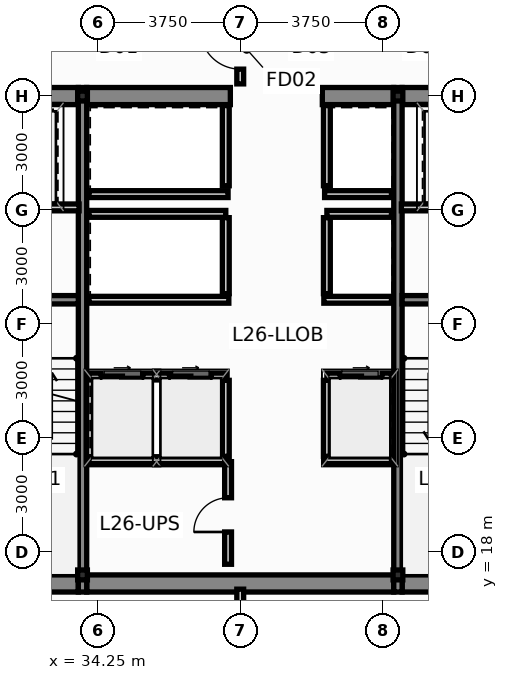
"""IFC4 building model, lengths in metres.
Left out: names, types, materials, properties, quantities, classifications, styles, units other than length and angle.
Written with IfcOpenShell. Run it as: python <this file> out.ifc"""

import sys

from ifc_helpers import new_model, si_unit, direction, frame, frame_2d, origin, origin_2d, place, context, subcontext, project, spatial, rectangle, i_section, extrude, source, transform, mapped, element, fill, save


model = new_model("IFC4")
c1 = context("Model", 3, precision=1e-05, world=origin(), true_north=direction((0.0, 1.0)))
c2 = subcontext(c1, "Body", "Model", "MODEL_VIEW")
j1 = project(units=[si_unit("LENGTHUNIT", "METRE"), si_unit("PLANEANGLEUNIT", "RADIAN")], contexts=[c1])
p1 = place(None, origin())
s1 = spatial("IfcSite", under=j1, at=p1, CompositionType="ELEMENT")
p2 = place(p1, origin())
s2 = spatial("IfcBuilding", under=s1, at=p2, CompositionType="ELEMENT")
p3 = place(p2, frame((0.0, 0.0, 101.75)))
s3 = spatial("IfcBuildingStorey", under=s2, at=p3, CompositionType="ELEMENT", Elevation=101.75)
m1 = source(origin(), c2, "Body", "SweptSolid", [
    extrude(i_section(OverallWidth=0.256, OverallDepth=0.26, WebThickness=0.01, FlangeThickness=0.017, at=origin_2d()), origin(), (0.0, 0.0, 1.0), 3.65),
])
for number, where, z_axis, x_axis in (
    (1, (33.85, 17.4, 0.0), (0.0, 0.0, 1.0), (1.0, 0.0, 0.0)),
    (2, (42.15, 17.4, 0.0), (0.0, 0.0, 1.0), (1.0, 0.0, 0.0)),
    (3, (33.85, 30.0, 0.0), (0.0, 0.0, 1.0), (1.0, 0.0, 0.0)),
    (4, (42.15, 30.0, 0.0), (0.0, 0.0, 1.0), (1.0, 0.0, 0.0)),
):
    element("IfcColumn", number, at=place(p3, frame(where, z_axis=z_axis, x_axis=x_axis)), inside=s3, PredefinedType="COLUMN", context=c2, shape_type="MappedRepresentation", body=[
        mapped(m1, transform((0.0, 0.0, 0.0), scale=1.0)),
    ])
p4 = place(p3, frame((30.84, 17.175, 0.0), z_axis=(0.0, 0.0, 1.0), x_axis=(1.0, 0.0, 0.0)))
e5 = element("IfcWall", 5, at=p4, inside=s3, PredefinedType="SHEAR", context=c2, shape_type="SweptSolid", body=[
    extrude(rectangle(XDim=2.9, YDim=0.45, at=frame_2d((1.45, 0.0))), origin(), (0.0, 0.0, 1.0), 3.65),
])
p5 = place(p3, frame((33.96, 17.175, 0.0), z_axis=(0.0, 0.0, 1.0), x_axis=(1.0, 0.0, 0.0)))
e6 = element("IfcWall", 6, at=p5, inside=s3, PredefinedType="SHEAR", context=c2, shape_type="SweptSolid", body=[
    extrude(rectangle(XDim=8.08, YDim=0.45, at=frame_2d((4.04, 0.0))), origin(), (0.0, 0.0, 1.0), 3.65),
])
for number, where, z_axis, x_axis in (
    (7, (42.26, 17.175, 0.0), (0.0, 0.0, 1.0), (1.0, 0.0, 0.0)),
    (8, (30.84, 30.0, 0.0), (0.0, 0.0, 1.0), (1.0, 0.0, 0.0)),
):
    element("IfcWall", number, at=place(p3, frame(where, z_axis=z_axis, x_axis=x_axis)), inside=s3, PredefinedType="SHEAR", context=c2, shape_type="SweptSolid", body=[
        extrude(rectangle(XDim=2.9, YDim=0.45, at=frame_2d((1.45, 0.0))), origin(), (0.0, 0.0, 1.0), 3.65),
    ])
p6 = place(p3, frame((33.96, 30.0, 0.0), z_axis=(0.0, 0.0, 1.0), x_axis=(1.0, 0.0, 0.0)))
e9 = element("IfcWall", 9, at=p6, inside=s3, PredefinedType="SHEAR", context=c2, shape_type="SweptSolid", body=[
    extrude(rectangle(XDim=3.78, YDim=0.45, at=frame_2d((1.89, 0.0))), origin(), (0.0, 0.0, 1.0), 3.65),
])
p7 = place(p3, frame((40.16, 30.0, 0.0), z_axis=(0.0, 0.0, 1.0), x_axis=(1.0, 0.0, 0.0)))
e10 = element("IfcWall", 10, at=p7, inside=s3, PredefinedType="SHEAR", context=c2, shape_type="SweptSolid", body=[
    extrude(rectangle(XDim=1.88, YDim=0.45, at=frame_2d((0.94, 0.0))), origin(), (0.0, 0.0, 1.0), 3.65),
])
p8 = place(p3, frame((42.26, 30.0, 0.0), z_axis=(0.0, 0.0, 1.0), x_axis=(1.0, 0.0, 0.0)))
e11 = element("IfcWall", 11, at=p8, inside=s3, PredefinedType="SHEAR", context=c2, shape_type="SweptSolid", body=[
    extrude(rectangle(XDim=2.9, YDim=0.45, at=frame_2d((1.45, 0.0))), origin(), (0.0, 0.0, 1.0), 3.65),
])
for number, where, z_axis, x_axis in (
    (12, (33.85, 16.95, 0.0), (0.0, 0.0, 1.0), (0.0, 1.0, 0.0)),
    (13, (42.15, 16.95, 0.0), (0.0, 0.0, 1.0), (0.0, 1.0, 0.0)),
):
    element("IfcWall", number, at=place(p3, frame(where, z_axis=z_axis, x_axis=x_axis)), inside=s3, PredefinedType="SHEAR", context=c2, shape_type="SweptSolid", body=[
        extrude(rectangle(XDim=13.275, YDim=0.22, at=frame_2d((6.638, 0.0))), origin(), (0.0, 0.0, 1.0), 3.65),
    ])
for number, where, z_axis, x_axis in (
    (14, (30.84, 24.64, 0.0), (0.0, 0.0, 1.0), (1.0, 0.0, 0.0)),
    (15, (42.26, 24.64, 0.0), (0.0, 0.0, 1.0), (1.0, 0.0, 0.0)),
):
    element("IfcWall", number, at=place(p3, frame(where, z_axis=z_axis, x_axis=x_axis)), inside=s3, PredefinedType="SHEAR", context=c2, shape_type="SweptSolid", body=[
        extrude(rectangle(XDim=2.9, YDim=0.22, at=frame_2d((1.45, 0.0))), origin(), (0.0, 0.0, 1.0), 3.65),
    ])
p9 = place(p3, frame((34.02, 22.62, 0.0), z_axis=(0.0, 0.0, 1.0), x_axis=(1.0, 0.0, 0.0)))
e16 = element("IfcWall", 16, at=p9, inside=s3, PredefinedType="PARTITIONING", context=c2, shape_type="SweptSolid", body=[
    extrude(rectangle(XDim=3.6, YDim=0.18, at=frame_2d((1.8, 0.0))), origin(), (0.0, 0.0, 1.0), 3.4),
])
p10 = place(p9, frame((0.32, 0.0, 0.0)))
e17 = element("IfcOpeningElement", 17, at=p10, cuts=e16, PredefinedType="OPENING", context=c2, shape_type="SweptSolid", body=[
    extrude(rectangle(XDim=1.1, YDim=2.2, at=frame_2d((0.55, 1.1))), frame((0.0, 0.102, 0.0), z_axis=(0.0, -1.0, 0.0), x_axis=(1.0, 0.0, 0.0)), (0.0, 0.0, 1.0), 0.204),
])
p11 = place(p9, frame((2.12, 0.0, 0.0)))
e18 = element("IfcOpeningElement", 18, at=p11, cuts=e16, PredefinedType="OPENING", context=c2, shape_type="SweptSolid", body=[
    extrude(rectangle(XDim=1.1, YDim=2.2, at=frame_2d((0.55, 1.1))), frame((0.0, 0.102, 0.0), z_axis=(0.0, -1.0, 0.0), x_axis=(1.0, 0.0, 0.0)), (0.0, 0.0, 1.0), 0.204),
])
p12 = place(p3, frame((40.28, 22.62, 0.0), z_axis=(0.0, 0.0, 1.0), x_axis=(1.0, 0.0, 0.0)))
e19 = element("IfcWall", 19, at=p12, inside=s3, PredefinedType="PARTITIONING", context=c2, shape_type="SweptSolid", body=[
    extrude(rectangle(XDim=1.7, YDim=0.18, at=frame_2d((0.85, 0.0))), origin(), (0.0, 0.0, 1.0), 3.4),
])
p13 = place(p12, frame((0.35, 0.0, 0.0)))
e20 = element("IfcOpeningElement", 20, at=p13, cuts=e19, PredefinedType="OPENING", context=c2, shape_type="SweptSolid", body=[
    extrude(rectangle(XDim=1.1, YDim=2.2, at=frame_2d((0.55, 1.1))), frame((0.0, 0.102, 0.0), z_axis=(0.0, -1.0, 0.0), x_axis=(1.0, 0.0, 0.0)), (0.0, 0.0, 1.0), 0.204),
])
for number, where, z_axis, x_axis in (
    (21, (37.62, 20.52, 0.0), (0.0, 0.0, 1.0), (0.0, 1.0, 0.0)),
    (22, (40.28, 20.52, 0.0), (0.0, 0.0, 1.0), (0.0, 1.0, 0.0)),
):
    element("IfcWall", number, at=place(p3, frame(where, z_axis=z_axis, x_axis=x_axis)), inside=s3, PredefinedType="PARTITIONING", context=c2, shape_type="SweptSolid", body=[
        extrude(rectangle(XDim=2.0, YDim=0.18, at=frame_2d((1.0, 0.0))), origin(), (0.0, 0.0, 1.0), 3.4),
    ])
p14 = place(p3, frame((34.02, 26.9, 0.0), z_axis=(0.0, 0.0, 1.0), x_axis=(1.0, 0.0, 0.0)))
e23 = element("IfcWall", 23, at=p14, inside=s3, PredefinedType="PARTITIONING", context=c2, shape_type="SweptSolid", body=[
    extrude(rectangle(XDim=3.6, YDim=0.18, at=frame_2d((1.8, 0.0))), origin(), (0.0, 0.0, 1.0), 3.4),
])
p15 = place(p3, frame((40.28, 26.9, 0.0), z_axis=(0.0, 0.0, 1.0), x_axis=(1.0, 0.0, 0.0)))
e24 = element("IfcWall", 24, at=p15, inside=s3, PredefinedType="PARTITIONING", context=c2, shape_type="SweptSolid", body=[
    extrude(rectangle(XDim=1.7, YDim=0.18, at=frame_2d((0.85, 0.0))), origin(), (0.0, 0.0, 1.0), 3.4),
])
for number, where, z_axis, x_axis in (
    (25, (37.62, 24.8, 0.0), (0.0, 0.0, 1.0), (0.0, 1.0, 0.0)),
    (26, (40.28, 24.8, 0.0), (0.0, 0.0, 1.0), (0.0, 1.0, 0.0)),
):
    element("IfcWall", number, at=place(p3, frame(where, z_axis=z_axis, x_axis=x_axis)), inside=s3, PredefinedType="PARTITIONING", context=c2, shape_type="SweptSolid", body=[
        extrude(rectangle(XDim=2.0, YDim=0.18, at=frame_2d((1.0, 0.0))), origin(), (0.0, 0.0, 1.0), 3.4),
    ])
p16 = place(p3, frame((34.02, 24.64, 0.0), z_axis=(0.0, 0.0, 1.0), x_axis=(1.0, 0.0, 0.0)))
e27 = element("IfcWall", 27, at=p16, inside=s3, PredefinedType="PARTITIONING", context=c2, shape_type="SweptSolid", body=[
    extrude(rectangle(XDim=3.68, YDim=0.18, at=frame_2d((1.84, 0.0))), origin(), (0.0, 0.0, 1.0), 3.4),
])
p17 = place(p3, frame((40.2, 24.64, 0.0), z_axis=(0.0, 0.0, 1.0), x_axis=(1.0, 0.0, 0.0)))
e28 = element("IfcWall", 28, at=p17, inside=s3, PredefinedType="PARTITIONING", context=c2, shape_type="SweptSolid", body=[
    extrude(rectangle(XDim=1.78, YDim=0.18, at=frame_2d((0.89, 0.0))), origin(), (0.0, 0.0, 1.0), 3.4),
])
p18 = place(p3, frame((34.02, 27.42, 0.0), z_axis=(0.0, 0.0, 1.0), x_axis=(1.0, 0.0, 0.0)))
e29 = element("IfcWall", 29, at=p18, inside=s3, PredefinedType="PARTITIONING", context=c2, shape_type="SweptSolid", body=[
    extrude(rectangle(XDim=3.66, YDim=0.18, at=frame_2d((1.83, 0.0))), origin(), (0.0, 0.0, 1.0), 3.4),
])
p19 = place(p3, frame((40.22, 27.42, 0.0), z_axis=(0.0, 0.0, 1.0), x_axis=(1.0, 0.0, 0.0)))
e30 = element("IfcWall", 30, at=p19, inside=s3, PredefinedType="PARTITIONING", context=c2, shape_type="SweptSolid", body=[
    extrude(rectangle(XDim=1.76, YDim=0.18, at=frame_2d((0.88, 0.0))), origin(), (0.0, 0.0, 1.0), 3.4),
])
for number, where, z_axis, x_axis in (
    (31, (37.62, 27.64, 0.0), (0.0, 0.0, 1.0), (0.0, 1.0, 0.0)),
    (32, (40.28, 27.64, 0.0), (0.0, 0.0, 1.0), (0.0, 1.0, 0.0)),
):
    element("IfcWall", number, at=place(p3, frame(where, z_axis=z_axis, x_axis=x_axis)), inside=s3, PredefinedType="PARTITIONING", context=c2, shape_type="SweptSolid", body=[
        extrude(rectangle(XDim=2.11, YDim=0.18, at=frame_2d((1.055, 0.0))), origin(), (0.0, 0.0, 1.0), 3.4),
    ])
for number, where, z_axis, x_axis in (
    (33, (30.86, 27.07, 0.0), (0.0, 0.0, 1.0), (1.0, 0.0, 0.0)),
    (34, (42.24, 27.07, 0.0), (0.0, 0.0, 1.0), (1.0, 0.0, 0.0)),
):
    element("IfcWall", number, at=place(p3, frame(where, z_axis=z_axis, x_axis=x_axis)), inside=s3, PredefinedType="PARTITIONING", context=c2, shape_type="SweptSolid", body=[
        extrude(rectangle(XDim=2.9, YDim=0.18, at=frame_2d((1.45, 0.0))), origin(), (0.0, 0.0, 1.0), 3.4),
    ])
p20 = place(p3, frame((34.02, 20.42, 0.0), z_axis=(0.0, 0.0, 1.0), x_axis=(1.0, 0.0, 0.0)))
e35 = element("IfcWall", 35, at=p20, inside=s3, PredefinedType="PARTITIONING", context=c2, shape_type="SweptSolid", body=[
    extrude(rectangle(XDim=3.64, YDim=0.18, at=frame_2d((1.82, 0.0))), origin(), (0.0, 0.0, 1.0), 3.4),
])
p21 = place(p3, frame((40.22, 20.42, 0.0), z_axis=(0.0, 0.0, 1.0), x_axis=(1.0, 0.0, 0.0)))
e36 = element("IfcWall", 36, at=p21, inside=s3, PredefinedType="PARTITIONING", context=c2, shape_type="SweptSolid", body=[
    extrude(rectangle(XDim=1.76, YDim=0.18, at=frame_2d((0.88, 0.0))), origin(), (0.0, 0.0, 1.0), 3.4),
])
p22 = place(p3, frame((37.68, 17.68, 0.0), z_axis=(0.0, 0.0, 1.0), x_axis=(0.0, 1.0, 0.0)))
e37 = element("IfcWall", 37, at=p22, inside=s3, PredefinedType="PARTITIONING", context=c2, shape_type="SweptSolid", body=[
    extrude(rectangle(XDim=2.7, YDim=0.18, at=frame_2d((1.35, 0.0))), origin(), (0.0, 0.0, 1.0), 3.4),
])
p23 = place(p22, frame((0.85, 0.0, 0.0)))
e38 = element("IfcOpeningElement", 38, at=p23, cuts=e37, PredefinedType="OPENING", context=c2, shape_type="SweptSolid", body=[
    extrude(rectangle(XDim=0.9, YDim=2.1, at=frame_2d((0.45, 1.05))), frame((0.0, 0.102, 0.0), z_axis=(0.0, -1.0, 0.0), x_axis=(1.0, 0.0, 0.0)), (0.0, 0.0, 1.0), 0.204),
])
p24 = place(p3, frame((38.0, 15.205, 0.0), z_axis=(0.0, 0.0, 1.0), x_axis=(0.0, 1.0, 0.0)))
e39 = element("IfcWall", 39, at=p24, inside=s3, PredefinedType="PARTITIONING", context=c2, shape_type="SweptSolid", body=[
    extrude(rectangle(XDim=1.82, YDim=0.18, at=frame_2d((0.91, 0.0))), origin(), (0.0, 0.0, 1.0), 3.4),
])
p25 = place(p24, frame((0.385, 0.0, 0.0)))
e40 = element("IfcOpeningElement", 40, at=p25, cuts=e39, PredefinedType="OPENING", context=c2, shape_type="SweptSolid", body=[
    extrude(rectangle(XDim=1.05, YDim=2.15, at=frame_2d((0.525, 1.075))), frame((0.0, 0.102, 0.0), z_axis=(0.0, -1.0, 0.0), x_axis=(1.0, 0.0, 0.0)), (0.0, 0.0, 1.0), 0.204),
])
p26 = place(p3, frame((38.0, 30.32, 0.0), z_axis=(0.0, 0.0, 1.0), x_axis=(0.0, 1.0, 0.0)))
e41 = element("IfcWall", 41, at=p26, inside=s3, PredefinedType="PARTITIONING", context=c2, shape_type="SweptSolid", body=[
    extrude(rectangle(XDim=1.825, YDim=0.18, at=frame_2d((0.913, 0.0))), origin(), (0.0, 0.0, 1.0), 3.4),
])
p27 = place(p26, frame((0.388, 0.0, 0.0)))
e42 = element("IfcOpeningElement", 42, at=p27, cuts=e41, PredefinedType="OPENING", context=c2, shape_type="SweptSolid", body=[
    extrude(rectangle(XDim=1.05, YDim=2.15, at=frame_2d((0.525, 1.075))), frame((0.0, 0.102, 0.0), z_axis=(0.0, -1.0, 0.0), x_axis=(1.0, 0.0, 0.0)), (0.0, 0.0, 1.0), 0.204),
])
p28 = place(p10, origin())
e43 = element("IfcDoor", 43, at=p28, inside=s3, OperationType="SLIDING_TO_LEFT", PredefinedType="DOOR", context=c2, shape_type="SweptSolid", body=[
    extrude(rectangle(XDim=1.1, YDim=2.2, at=frame_2d((0.55, 1.1))), frame((0.0, 0.025, 0.0), z_axis=(0.0, -1.0, 0.0), x_axis=(1.0, 0.0, 0.0)), (0.0, 0.0, 1.0), 0.05),
])
fill(e17, e43)
p29 = place(p11, origin())
e44 = element("IfcDoor", 44, at=p29, inside=s3, OperationType="SLIDING_TO_RIGHT", PredefinedType="DOOR", context=c2, shape_type="SweptSolid", body=[
    extrude(rectangle(XDim=1.1, YDim=2.2, at=frame_2d((0.55, 1.1))), frame((0.0, 0.025, 0.0), z_axis=(0.0, -1.0, 0.0), x_axis=(1.0, 0.0, 0.0)), (0.0, 0.0, 1.0), 0.05),
])
fill(e18, e44)
p30 = place(p13, origin())
e45 = element("IfcDoor", 45, at=p30, inside=s3, OperationType="SLIDING_TO_LEFT", PredefinedType="DOOR", context=c2, shape_type="SweptSolid", body=[
    extrude(rectangle(XDim=1.1, YDim=2.2, at=frame_2d((0.55, 1.1))), frame((0.0, 0.025, 0.0), z_axis=(0.0, -1.0, 0.0), x_axis=(1.0, 0.0, 0.0)), (0.0, 0.0, 1.0), 0.05),
])
fill(e20, e45)
p31 = place(p23, origin())
e46 = element("IfcDoor", 46, at=p31, inside=s3, OperationType="SINGLE_SWING_LEFT", PredefinedType="DOOR", context=c2, shape_type="SweptSolid", body=[
    extrude(rectangle(XDim=0.9, YDim=2.1, at=frame_2d((0.45, 1.05))), frame((0.0, 0.025, 0.0), z_axis=(0.0, -1.0, 0.0), x_axis=(1.0, 0.0, 0.0)), (0.0, 0.0, 1.0), 0.05),
])
fill(e38, e46)
p32 = place(p27, origin())
e47 = element("IfcDoor", 47, at=p32, inside=s3, OperationType="SINGLE_SWING_RIGHT", PredefinedType="DOOR", context=c2, shape_type="SweptSolid", body=[
    extrude(rectangle(XDim=1.05, YDim=2.15, at=frame_2d((0.525, 1.075))), frame((0.0, 0.025, 0.0), z_axis=(0.0, -1.0, 0.0), x_axis=(1.0, 0.0, 0.0)), (0.0, 0.0, 1.0), 0.05),
])
fill(e42, e47)
save(model, sys.argv[1])
